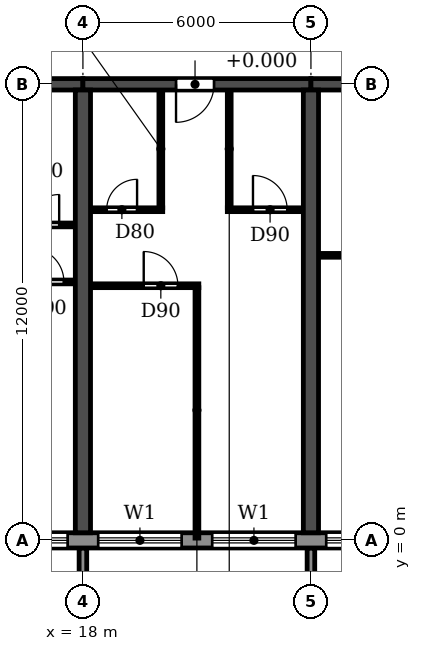
"""IFC4 building model, lengths in metres.
Left out: names, types, materials, properties, quantities, classifications, styles, units other than length and angle.
Written with IfcOpenShell. Run it as: python <this file> out.ifc"""

import sys

from ifc_helpers import new_model, si_unit, direction, frame, frame_2d, origin, place, context, subcontext, project, spatial, polyline, rectangle, outline, extrude, source, transform, mapped, element, fill, save


model = new_model("IFC4")
c1 = context("Model", 3, precision=1e-05, world=origin(), true_north=direction((0.0, 1.0)))
c2 = subcontext(c1, "Body", "Model", "MODEL_VIEW")
j1 = project(units=[si_unit("LENGTHUNIT", "METRE"), si_unit("PLANEANGLEUNIT", "RADIAN")], contexts=[c1])
p1 = place(None, origin())
s1 = spatial("IfcSite", under=j1, at=p1, CompositionType="ELEMENT")
p2 = place(p1, origin())
s2 = spatial("IfcBuilding", under=s1, at=p2, CompositionType="ELEMENT")
p3 = place(p2, frame((0.0, 0.0, 33.3)))
s3 = spatial("IfcBuildingStorey", under=s2, at=p3, CompositionType="ELEMENT", Elevation=33.3)
for number, where, z_axis, x_axis in (
    (1, (18.0, 0.2, 0.0), (0.0, 0.0, 1.0), (0.0, 1.0, 0.0)),
    (2, (24.0, 0.2, 0.0), (0.0, 0.0, 1.0), (0.0, 1.0, 0.0)),
):
    element("IfcWall", number, at=place(p3, frame(where, z_axis=z_axis, x_axis=x_axis)), inside=s3, PredefinedType="SHEAR", context=c2, shape_type="SweptSolid", body=[
        extrude(rectangle(XDim=11.65, YDim=0.4, at=frame_2d((5.825, 0.0))), origin(), (0.0, 0.0, 1.0), 3.05),
    ])
p4 = place(p3, frame((12.0, 12.0, 0.0), z_axis=(0.0, 0.0, 1.0), x_axis=(1.0, 0.0, 0.0)))
e3 = element("IfcWall", 3, at=p4, inside=s3, PredefinedType="SHEAR", context=c2, shape_type="SweptSolid", body=[
    extrude(rectangle(XDim=6.0, YDim=0.3, at=frame_2d((3.0, 0.0))), origin(), (0.0, 0.0, 1.0), 2.45),
])
p5 = place(p4, frame((2.55, 0.0, 0.0)))
e4 = element("IfcOpeningElement", 4, at=p5, cuts=e3, PredefinedType="OPENING", context=c2, shape_type="SweptSolid", body=[
    extrude(rectangle(XDim=1.0, YDim=2.1, at=frame_2d((0.5, 1.05))), frame((0.0, 0.16, 0.0), z_axis=(0.0, -1.0, 0.0), x_axis=(1.0, 0.0, 0.0)), (0.0, 0.0, 1.0), 0.32),
])
p6 = place(p3, frame((18.0, 12.0, 0.0), z_axis=(0.0, 0.0, 1.0), x_axis=(1.0, 0.0, 0.0)))
e5 = element("IfcWall", 5, at=p6, inside=s3, PredefinedType="SHEAR", context=c2, shape_type="SweptSolid", body=[
    extrude(rectangle(XDim=6.0, YDim=0.3, at=frame_2d((3.0, 0.0))), origin(), (0.0, 0.0, 1.0), 2.45),
])
p7 = place(p6, frame((2.45, 0.0, 0.0)))
e6 = element("IfcOpeningElement", 6, at=p7, cuts=e5, PredefinedType="OPENING", context=c2, shape_type="SweptSolid", body=[
    extrude(rectangle(XDim=1.0, YDim=2.1, at=frame_2d((0.5, 1.05))), frame((0.0, 0.16, 0.0), z_axis=(0.0, -1.0, 0.0), x_axis=(1.0, 0.0, 0.0)), (0.0, 0.0, 1.0), 0.32),
])
p8 = place(p3, frame((24.0, 12.0, 0.0), z_axis=(0.0, 0.0, 1.0), x_axis=(1.0, 0.0, 0.0)))
e7 = element("IfcWall", 7, at=p8, inside=s3, PredefinedType="SHEAR", context=c2, shape_type="SweptSolid", body=[
    extrude(rectangle(XDim=6.0, YDim=0.3, at=frame_2d((3.0, 0.0))), origin(), (0.0, 0.0, 1.0), 2.45),
])
p9 = place(p8, frame((2.55, 0.0, 0.0)))
e8 = element("IfcOpeningElement", 8, at=p9, cuts=e7, PredefinedType="OPENING", context=c2, shape_type="SweptSolid", body=[
    extrude(rectangle(XDim=1.0, YDim=2.1, at=frame_2d((0.5, 1.05))), frame((0.0, 0.16, 0.0), z_axis=(0.0, -1.0, 0.0), x_axis=(1.0, 0.0, 0.0)), (0.0, 0.0, 1.0), 0.32),
])
p10 = place(p3, frame((4.683, 0.0, 0.0), z_axis=(0.0, 0.0, 1.0), x_axis=(1.0, 0.0, 0.0)))
e9 = element("IfcWall", 9, at=p10, inside=s3, PredefinedType="STANDARD", context=c2, shape_type="SweptSolid", body=[
    extrude(rectangle(XDim=92.634, YDim=0.4, at=frame_2d((46.317, 0.0))), origin(), (0.0, 0.0, 1.0), 3.05),
])
p11 = place(p10, frame((1.717, 0.0, 0.9)))
e10 = element("IfcOpeningElement", 10, at=p11, cuts=e9, PredefinedType="OPENING", context=c2, shape_type="SweptSolid", body=[
    extrude(rectangle(XDim=2.2, YDim=1.5, at=frame_2d((1.1, 0.75))), frame((0.0, 0.21, 0.0), z_axis=(0.0, -1.0, 0.0), x_axis=(1.0, 0.0, 0.0)), (0.0, 0.0, 1.0), 0.42),
])
p12 = place(p10, frame((4.717, 0.0, 0.9)))
e11 = element("IfcOpeningElement", 11, at=p12, cuts=e9, PredefinedType="OPENING", context=c2, shape_type="SweptSolid", body=[
    extrude(rectangle(XDim=2.2, YDim=1.5, at=frame_2d((1.1, 0.75))), frame((0.0, 0.21, 0.0), z_axis=(0.0, -1.0, 0.0), x_axis=(1.0, 0.0, 0.0)), (0.0, 0.0, 1.0), 0.42),
])
p13 = place(p10, frame((7.917, 0.0, 0.0)))
e12 = element("IfcOpeningElement", 12, at=p13, cuts=e9, PredefinedType="OPENING", context=c2, shape_type="SweptSolid", body=[
    extrude(rectangle(XDim=1.8, YDim=2.4, at=frame_2d((0.9, 1.2))), frame((0.0, 0.21, 0.0), z_axis=(0.0, -1.0, 0.0), x_axis=(1.0, 0.0, 0.0)), (0.0, 0.0, 1.0), 0.42),
])
p14 = place(p10, frame((10.717, 0.0, 0.9)))
e13 = element("IfcOpeningElement", 13, at=p14, cuts=e9, PredefinedType="OPENING", context=c2, shape_type="SweptSolid", body=[
    extrude(rectangle(XDim=2.2, YDim=1.5, at=frame_2d((1.1, 0.75))), frame((0.0, 0.21, 0.0), z_axis=(0.0, -1.0, 0.0), x_axis=(1.0, 0.0, 0.0)), (0.0, 0.0, 1.0), 0.42),
])
p15 = place(p10, frame((13.717, 0.0, 0.9)))
e14 = element("IfcOpeningElement", 14, at=p15, cuts=e9, PredefinedType="OPENING", context=c2, shape_type="SweptSolid", body=[
    extrude(rectangle(XDim=2.2, YDim=1.5, at=frame_2d((1.1, 0.75))), frame((0.0, 0.21, 0.0), z_axis=(0.0, -1.0, 0.0), x_axis=(1.0, 0.0, 0.0)), (0.0, 0.0, 1.0), 0.42),
])
p16 = place(p10, frame((16.717, 0.0, 0.9)))
e15 = element("IfcOpeningElement", 15, at=p16, cuts=e9, PredefinedType="OPENING", context=c2, shape_type="SweptSolid", body=[
    extrude(rectangle(XDim=2.2, YDim=1.5, at=frame_2d((1.1, 0.75))), frame((0.0, 0.21, 0.0), z_axis=(0.0, -1.0, 0.0), x_axis=(1.0, 0.0, 0.0)), (0.0, 0.0, 1.0), 0.42),
])
p17 = place(p10, frame((19.717, 0.0, 0.9)))
e16 = element("IfcOpeningElement", 16, at=p17, cuts=e9, PredefinedType="OPENING", context=c2, shape_type="SweptSolid", body=[
    extrude(rectangle(XDim=2.2, YDim=1.5, at=frame_2d((1.1, 0.75))), frame((0.0, 0.21, 0.0), z_axis=(0.0, -1.0, 0.0), x_axis=(1.0, 0.0, 0.0)), (0.0, 0.0, 1.0), 0.42),
])
p18 = place(p10, frame((22.917, 0.0, 0.0)))
e17 = element("IfcOpeningElement", 17, at=p18, cuts=e9, PredefinedType="OPENING", context=c2, shape_type="SweptSolid", body=[
    extrude(rectangle(XDim=1.8, YDim=2.4, at=frame_2d((0.9, 1.2))), frame((0.0, 0.21, 0.0), z_axis=(0.0, -1.0, 0.0), x_axis=(1.0, 0.0, 0.0)), (0.0, 0.0, 1.0), 0.42),
])
p19 = place(p10, frame((25.717, 0.0, 0.9)))
e18 = element("IfcOpeningElement", 18, at=p19, cuts=e9, PredefinedType="OPENING", context=c2, shape_type="SweptSolid", body=[
    extrude(rectangle(XDim=2.2, YDim=1.5, at=frame_2d((1.1, 0.75))), frame((0.0, 0.21, 0.0), z_axis=(0.0, -1.0, 0.0), x_axis=(1.0, 0.0, 0.0)), (0.0, 0.0, 1.0), 0.42),
])
p20 = place(p10, frame((28.717, 0.0, 0.9)))
e19 = element("IfcOpeningElement", 19, at=p20, cuts=e9, PredefinedType="OPENING", context=c2, shape_type="SweptSolid", body=[
    extrude(rectangle(XDim=2.2, YDim=1.5, at=frame_2d((1.1, 0.75))), frame((0.0, 0.21, 0.0), z_axis=(0.0, -1.0, 0.0), x_axis=(1.0, 0.0, 0.0)), (0.0, 0.0, 1.0), 0.42),
])
p21 = place(p10, frame((31.717, 0.0, 0.9)))
e20 = element("IfcOpeningElement", 20, at=p21, cuts=e9, PredefinedType="OPENING", context=c2, shape_type="SweptSolid", body=[
    extrude(rectangle(XDim=2.2, YDim=1.5, at=frame_2d((1.1, 0.75))), frame((0.0, 0.21, 0.0), z_axis=(0.0, -1.0, 0.0), x_axis=(1.0, 0.0, 0.0)), (0.0, 0.0, 1.0), 0.42),
])
p22 = place(p10, frame((34.717, 0.0, 0.9)))
e21 = element("IfcOpeningElement", 21, at=p22, cuts=e9, PredefinedType="OPENING", context=c2, shape_type="SweptSolid", body=[
    extrude(rectangle(XDim=2.2, YDim=1.5, at=frame_2d((1.1, 0.75))), frame((0.0, 0.21, 0.0), z_axis=(0.0, -1.0, 0.0), x_axis=(1.0, 0.0, 0.0)), (0.0, 0.0, 1.0), 0.42),
])
p23 = place(p10, frame((37.717, 0.0, 0.9)))
e22 = element("IfcOpeningElement", 22, at=p23, cuts=e9, PredefinedType="OPENING", context=c2, shape_type="SweptSolid", body=[
    extrude(rectangle(XDim=2.2, YDim=1.5, at=frame_2d((1.1, 0.75))), frame((0.0, 0.21, 0.0), z_axis=(0.0, -1.0, 0.0), x_axis=(1.0, 0.0, 0.0)), (0.0, 0.0, 1.0), 0.42),
])
p24 = place(p10, frame((40.717, 0.0, 0.9)))
e23 = element("IfcOpeningElement", 23, at=p24, cuts=e9, PredefinedType="OPENING", context=c2, shape_type="SweptSolid", body=[
    extrude(rectangle(XDim=2.2, YDim=1.5, at=frame_2d((1.1, 0.75))), frame((0.0, 0.21, 0.0), z_axis=(0.0, -1.0, 0.0), x_axis=(1.0, 0.0, 0.0)), (0.0, 0.0, 1.0), 0.42),
])
p25 = place(p10, frame((43.717, 0.0, 0.9)))
e24 = element("IfcOpeningElement", 24, at=p25, cuts=e9, PredefinedType="OPENING", context=c2, shape_type="SweptSolid", body=[
    extrude(rectangle(XDim=2.2, YDim=1.5, at=frame_2d((1.1, 0.75))), frame((0.0, 0.21, 0.0), z_axis=(0.0, -1.0, 0.0), x_axis=(1.0, 0.0, 0.0)), (0.0, 0.0, 1.0), 0.42),
])
p26 = place(p10, frame((46.917, 0.0, 0.0)))
e25 = element("IfcOpeningElement", 25, at=p26, cuts=e9, PredefinedType="OPENING", context=c2, shape_type="SweptSolid", body=[
    extrude(rectangle(XDim=1.8, YDim=2.4, at=frame_2d((0.9, 1.2))), frame((0.0, 0.21, 0.0), z_axis=(0.0, -1.0, 0.0), x_axis=(1.0, 0.0, 0.0)), (0.0, 0.0, 1.0), 0.42),
])
p27 = place(p10, frame((49.717, 0.0, 0.9)))
e26 = element("IfcOpeningElement", 26, at=p27, cuts=e9, PredefinedType="OPENING", context=c2, shape_type="SweptSolid", body=[
    extrude(rectangle(XDim=2.2, YDim=1.5, at=frame_2d((1.1, 0.75))), frame((0.0, 0.21, 0.0), z_axis=(0.0, -1.0, 0.0), x_axis=(1.0, 0.0, 0.0)), (0.0, 0.0, 1.0), 0.42),
])
p28 = place(p10, frame((52.717, 0.0, 0.9)))
e27 = element("IfcOpeningElement", 27, at=p28, cuts=e9, PredefinedType="OPENING", context=c2, shape_type="SweptSolid", body=[
    extrude(rectangle(XDim=2.2, YDim=1.5, at=frame_2d((1.1, 0.75))), frame((0.0, 0.21, 0.0), z_axis=(0.0, -1.0, 0.0), x_axis=(1.0, 0.0, 0.0)), (0.0, 0.0, 1.0), 0.42),
])
p29 = place(p10, frame((55.717, 0.0, 0.9)))
e28 = element("IfcOpeningElement", 28, at=p29, cuts=e9, PredefinedType="OPENING", context=c2, shape_type="SweptSolid", body=[
    extrude(rectangle(XDim=2.2, YDim=1.5, at=frame_2d((1.1, 0.75))), frame((0.0, 0.21, 0.0), z_axis=(0.0, -1.0, 0.0), x_axis=(1.0, 0.0, 0.0)), (0.0, 0.0, 1.0), 0.42),
])
p30 = place(p10, frame((58.917, 0.0, 0.0)))
e29 = element("IfcOpeningElement", 29, at=p30, cuts=e9, PredefinedType="OPENING", context=c2, shape_type="SweptSolid", body=[
    extrude(rectangle(XDim=1.8, YDim=2.4, at=frame_2d((0.9, 1.2))), frame((0.0, 0.21, 0.0), z_axis=(0.0, -1.0, 0.0), x_axis=(1.0, 0.0, 0.0)), (0.0, 0.0, 1.0), 0.42),
])
p31 = place(p10, frame((61.717, 0.0, 0.9)))
e30 = element("IfcOpeningElement", 30, at=p31, cuts=e9, PredefinedType="OPENING", context=c2, shape_type="SweptSolid", body=[
    extrude(rectangle(XDim=2.2, YDim=1.5, at=frame_2d((1.1, 0.75))), frame((0.0, 0.21, 0.0), z_axis=(0.0, -1.0, 0.0), x_axis=(1.0, 0.0, 0.0)), (0.0, 0.0, 1.0), 0.42),
])
p32 = place(p10, frame((64.717, 0.0, 0.9)))
e31 = element("IfcOpeningElement", 31, at=p32, cuts=e9, PredefinedType="OPENING", context=c2, shape_type="SweptSolid", body=[
    extrude(rectangle(XDim=2.2, YDim=1.5, at=frame_2d((1.1, 0.75))), frame((0.0, 0.21, 0.0), z_axis=(0.0, -1.0, 0.0), x_axis=(1.0, 0.0, 0.0)), (0.0, 0.0, 1.0), 0.42),
])
p33 = place(p10, frame((67.717, 0.0, 0.9)))
e32 = element("IfcOpeningElement", 32, at=p33, cuts=e9, PredefinedType="OPENING", context=c2, shape_type="SweptSolid", body=[
    extrude(rectangle(XDim=2.2, YDim=1.5, at=frame_2d((1.1, 0.75))), frame((0.0, 0.21, 0.0), z_axis=(0.0, -1.0, 0.0), x_axis=(1.0, 0.0, 0.0)), (0.0, 0.0, 1.0), 0.42),
])
p34 = place(p10, frame((70.917, 0.0, 0.0)))
e33 = element("IfcOpeningElement", 33, at=p34, cuts=e9, PredefinedType="OPENING", context=c2, shape_type="SweptSolid", body=[
    extrude(rectangle(XDim=1.8, YDim=2.4, at=frame_2d((0.9, 1.2))), frame((0.0, 0.21, 0.0), z_axis=(0.0, -1.0, 0.0), x_axis=(1.0, 0.0, 0.0)), (0.0, 0.0, 1.0), 0.42),
])
p35 = place(p10, frame((73.717, 0.0, 0.9)))
e34 = element("IfcOpeningElement", 34, at=p35, cuts=e9, PredefinedType="OPENING", context=c2, shape_type="SweptSolid", body=[
    extrude(rectangle(XDim=2.2, YDim=1.5, at=frame_2d((1.1, 0.75))), frame((0.0, 0.21, 0.0), z_axis=(0.0, -1.0, 0.0), x_axis=(1.0, 0.0, 0.0)), (0.0, 0.0, 1.0), 0.42),
])
p36 = place(p10, frame((76.717, 0.0, 0.9)))
e35 = element("IfcOpeningElement", 35, at=p36, cuts=e9, PredefinedType="OPENING", context=c2, shape_type="SweptSolid", body=[
    extrude(rectangle(XDim=2.2, YDim=1.5, at=frame_2d((1.1, 0.75))), frame((0.0, 0.21, 0.0), z_axis=(0.0, -1.0, 0.0), x_axis=(1.0, 0.0, 0.0)), (0.0, 0.0, 1.0), 0.42),
])
p37 = place(p10, frame((79.717, 0.0, 0.9)))
e36 = element("IfcOpeningElement", 36, at=p37, cuts=e9, PredefinedType="OPENING", context=c2, shape_type="SweptSolid", body=[
    extrude(rectangle(XDim=2.2, YDim=1.5, at=frame_2d((1.1, 0.75))), frame((0.0, 0.21, 0.0), z_axis=(0.0, -1.0, 0.0), x_axis=(1.0, 0.0, 0.0)), (0.0, 0.0, 1.0), 0.42),
])
p38 = place(p10, frame((82.717, 0.0, 0.9)))
e37 = element("IfcOpeningElement", 37, at=p38, cuts=e9, PredefinedType="OPENING", context=c2, shape_type="SweptSolid", body=[
    extrude(rectangle(XDim=2.2, YDim=1.5, at=frame_2d((1.1, 0.75))), frame((0.0, 0.21, 0.0), z_axis=(0.0, -1.0, 0.0), x_axis=(1.0, 0.0, 0.0)), (0.0, 0.0, 1.0), 0.42),
])
p39 = place(p10, frame((85.717, 0.0, 0.9)))
e38 = element("IfcOpeningElement", 38, at=p39, cuts=e9, PredefinedType="OPENING", context=c2, shape_type="SweptSolid", body=[
    extrude(rectangle(XDim=2.2, YDim=1.5, at=frame_2d((1.1, 0.75))), frame((0.0, 0.21, 0.0), z_axis=(0.0, -1.0, 0.0), x_axis=(1.0, 0.0, 0.0)), (0.0, 0.0, 1.0), 0.42),
])
p40 = place(p10, frame((88.717, 0.0, 0.9)))
e39 = element("IfcOpeningElement", 39, at=p40, cuts=e9, PredefinedType="OPENING", context=c2, shape_type="SweptSolid", body=[
    extrude(rectangle(XDim=2.2, YDim=1.5, at=frame_2d((1.1, 0.75))), frame((0.0, 0.21, 0.0), z_axis=(0.0, -1.0, 0.0), x_axis=(1.0, 0.0, 0.0)), (0.0, 0.0, 1.0), 0.42),
])
m1 = source(origin(), c2, "Body", "SweptSolid", [
    extrude(outline(polyline([(0.0, 0.0), (0.2, 0.0), (0.2, 1.65), (0.0, 1.65), (0.0, 0.0)])), origin(), (0.0, 0.0, 1.0), 3.1),
])
for number, where in (
    (40, (17.9, -1.85, 0.0)),
    (41, (23.9, -1.85, 0.0)),
):
    element("IfcWall", number, at=place(p3, frame(where)), inside=s3, PredefinedType="STANDARD", context=c2, shape_type="MappedRepresentation", body=[
        mapped(m1, transform((0.0, 0.0, 0.0))),
    ])
p41 = place(p3, frame((18.21, 6.7, 0.0), z_axis=(0.0, 0.0, 1.0), x_axis=(1.0, 0.0, 0.0)))
e42 = element("IfcWall", 42, at=p41, inside=s3, PredefinedType="PARTITIONING", context=c2, shape_type="SweptSolid", body=[
    extrude(rectangle(XDim=2.84, YDim=0.1, at=frame_2d((1.42, 0.0))), origin(), (0.0, 0.0, 1.0), 3.05),
])
p42 = place(p41, frame((1.39, 0.0, 0.0)))
e43 = element("IfcOpeningElement", 43, at=p42, cuts=e42, PredefinedType="OPENING", context=c2, shape_type="SweptSolid", body=[
    extrude(rectangle(XDim=0.9, YDim=2.1, at=frame_2d((0.45, 1.05))), frame((0.0, 0.06, 0.0), z_axis=(0.0, -1.0, 0.0), x_axis=(1.0, 0.0, 0.0)), (0.0, 0.0, 1.0), 0.12),
])
p43 = place(p3, frame((14.95, 6.8, 0.0), z_axis=(0.0, 0.0, 1.0), x_axis=(1.0, 0.0, 0.0)))
e44 = element("IfcWall", 44, at=p43, inside=s3, PredefinedType="PARTITIONING", context=c2, shape_type="SweptSolid", body=[
    extrude(rectangle(XDim=2.84, YDim=0.1, at=frame_2d((1.42, 0.0))), origin(), (0.0, 0.0, 1.0), 3.05),
])
p44 = place(p43, frame((1.65, 0.0, 0.0)))
e45 = element("IfcOpeningElement", 45, at=p44, cuts=e44, PredefinedType="OPENING", context=c2, shape_type="SweptSolid", body=[
    extrude(rectangle(XDim=0.9, YDim=2.1, at=frame_2d((0.45, 1.05))), frame((0.0, 0.06, 0.0), z_axis=(0.0, -1.0, 0.0), x_axis=(1.0, 0.0, 0.0)), (0.0, 0.0, 1.0), 0.12),
])
p45 = place(p3, frame((24.21, 7.5, 0.0), z_axis=(0.0, 0.0, 1.0), x_axis=(1.0, 0.0, 0.0)))
e46 = element("IfcWall", 46, at=p45, inside=s3, PredefinedType="PARTITIONING", context=c2, shape_type="SweptSolid", body=[
    extrude(rectangle(XDim=1.99, YDim=0.1, at=frame_2d((0.995, 0.0))), origin(), (0.0, 0.0, 1.0), 3.05),
])
p46 = place(p3, frame((15.9, 8.3, 0.0), z_axis=(0.0, 0.0, 1.0), x_axis=(1.0, 0.0, 0.0)))
e47 = element("IfcWall", 47, at=p46, inside=s3, PredefinedType="PARTITIONING", context=c2, shape_type="SweptSolid", body=[
    extrude(rectangle(XDim=1.89, YDim=0.1, at=frame_2d((0.945, 0.0))), origin(), (0.0, 0.0, 1.0), 3.05),
])
p47 = place(p46, frame((0.675, 0.0, 0.0)))
e48 = element("IfcOpeningElement", 48, at=p47, cuts=e47, PredefinedType="OPENING", context=c2, shape_type="SweptSolid", body=[
    extrude(rectangle(XDim=0.8, YDim=2.1, at=frame_2d((0.4, 1.05))), frame((0.0, 0.06, 0.0), z_axis=(0.0, -1.0, 0.0), x_axis=(1.0, 0.0, 0.0)), (0.0, 0.0, 1.0), 0.12),
])
p48 = place(p3, frame((18.21, 8.7, 0.0), z_axis=(0.0, 0.0, 1.0), x_axis=(1.0, 0.0, 0.0)))
e49 = element("IfcWall", 49, at=p48, inside=s3, PredefinedType="PARTITIONING", context=c2, shape_type="SweptSolid", body=[
    extrude(rectangle(XDim=1.89, YDim=0.1, at=frame_2d((0.945, 0.0))), origin(), (0.0, 0.0, 1.0), 3.05),
])
p49 = place(p48, frame((0.415, 0.0, 0.0)))
e50 = element("IfcOpeningElement", 50, at=p49, cuts=e49, PredefinedType="OPENING", context=c2, shape_type="SweptSolid", body=[
    extrude(rectangle(XDim=0.8, YDim=2.1, at=frame_2d((0.4, 1.05))), frame((0.0, 0.06, 0.0), z_axis=(0.0, -1.0, 0.0), x_axis=(1.0, 0.0, 0.0)), (0.0, 0.0, 1.0), 0.12),
])
p50 = place(p3, frame((21.8, 8.7, 0.0), z_axis=(0.0, 0.0, 1.0), x_axis=(1.0, 0.0, 0.0)))
e51 = element("IfcWall", 51, at=p50, inside=s3, PredefinedType="PARTITIONING", context=c2, shape_type="SweptSolid", body=[
    extrude(rectangle(XDim=1.99, YDim=0.1, at=frame_2d((0.995, 0.0))), origin(), (0.0, 0.0, 1.0), 3.05),
])
p51 = place(p50, frame((0.675, 0.0, 0.0)))
e52 = element("IfcOpeningElement", 52, at=p51, cuts=e51, PredefinedType="OPENING", context=c2, shape_type="SweptSolid", body=[
    extrude(rectangle(XDim=0.9, YDim=2.1, at=frame_2d((0.45, 1.05))), frame((0.0, 0.06, 0.0), z_axis=(0.0, -1.0, 0.0), x_axis=(1.0, 0.0, 0.0)), (0.0, 0.0, 1.0), 0.12),
])
p52 = place(p3, frame((20.05, 8.75, 0.0), z_axis=(0.0, 0.0, 1.0), x_axis=(0.0, 1.0, 0.0)))
e53 = element("IfcWall", 53, at=p52, inside=s3, PredefinedType="PARTITIONING", context=c2, shape_type="SweptSolid", body=[
    extrude(rectangle(XDim=3.09, YDim=0.1, at=frame_2d((1.545, 0.0))), origin(), (0.0, 0.0, 1.0), 3.05),
])
p53 = place(p3, frame((21.0, 0.06, 0.0), z_axis=(0.0, 0.0, 1.0), x_axis=(0.0, 1.0, 0.0)))
e54 = element("IfcWall", 54, at=p53, inside=s3, PredefinedType="PARTITIONING", context=c2, shape_type="SweptSolid", body=[
    extrude(rectangle(XDim=6.59, YDim=0.1, at=frame_2d((3.295, 0.0))), origin(), (0.0, 0.0, 1.0), 3.05),
])
p54 = place(p3, frame((21.85, 8.75, 0.0), z_axis=(0.0, 0.0, 1.0), x_axis=(0.0, 1.0, 0.0)))
e55 = element("IfcWall", 55, at=p54, inside=s3, PredefinedType="PARTITIONING", context=c2, shape_type="SweptSolid", body=[
    extrude(rectangle(XDim=3.09, YDim=0.1, at=frame_2d((1.545, 0.0))), origin(), (0.0, 0.0, 1.0), 3.05),
])
p55 = place(p14, origin())
e56 = element("IfcWindow", 56, at=p55, inside=s3, PartitioningType="DOUBLE_PANEL_HORIZONTAL", PredefinedType="WINDOW", context=c2, shape_type="SweptSolid", body=[
    extrude(rectangle(XDim=2.2, YDim=1.5, at=frame_2d((1.1, 0.75))), frame((0.0, 0.03, 0.0), z_axis=(0.0, -1.0, 0.0), x_axis=(1.0, 0.0, 0.0)), (0.0, 0.0, 1.0), 0.06),
])
fill(e13, e56)
p56 = place(p15, origin())
e57 = element("IfcWindow", 57, at=p56, inside=s3, PartitioningType="DOUBLE_PANEL_HORIZONTAL", PredefinedType="WINDOW", context=c2, shape_type="SweptSolid", body=[
    extrude(rectangle(XDim=2.2, YDim=1.5, at=frame_2d((1.1, 0.75))), frame((0.0, 0.03, 0.0), z_axis=(0.0, -1.0, 0.0), x_axis=(1.0, 0.0, 0.0)), (0.0, 0.0, 1.0), 0.06),
])
fill(e14, e57)
p57 = place(p16, origin())
e58 = element("IfcWindow", 58, at=p57, inside=s3, PartitioningType="DOUBLE_PANEL_HORIZONTAL", PredefinedType="WINDOW", context=c2, shape_type="SweptSolid", body=[
    extrude(rectangle(XDim=2.2, YDim=1.5, at=frame_2d((1.1, 0.75))), frame((0.0, 0.03, 0.0), z_axis=(0.0, -1.0, 0.0), x_axis=(1.0, 0.0, 0.0)), (0.0, 0.0, 1.0), 0.06),
])
fill(e15, e58)
p58 = place(p17, origin())
e59 = element("IfcWindow", 59, at=p58, inside=s3, PartitioningType="DOUBLE_PANEL_HORIZONTAL", PredefinedType="WINDOW", context=c2, shape_type="SweptSolid", body=[
    extrude(rectangle(XDim=2.2, YDim=1.5, at=frame_2d((1.1, 0.75))), frame((0.0, 0.03, 0.0), z_axis=(0.0, -1.0, 0.0), x_axis=(1.0, 0.0, 0.0)), (0.0, 0.0, 1.0), 0.06),
])
fill(e16, e59)
p59 = place(p47, origin())
e60 = element("IfcDoor", 60, at=p59, inside=s3, OperationType="SINGLE_SWING_RIGHT", PredefinedType="DOOR", context=c2, shape_type="SweptSolid", body=[
    extrude(rectangle(XDim=0.8, YDim=2.1, at=frame_2d((0.4, 1.05))), frame((0.0, 0.025, 0.0), z_axis=(0.0, -1.0, 0.0), x_axis=(1.0, 0.0, 0.0)), (0.0, 0.0, 1.0), 0.05),
])
fill(e48, e60)
p60 = place(p44, origin())
e61 = element("IfcDoor", 61, at=p60, inside=s3, OperationType="SINGLE_SWING_LEFT", PredefinedType="DOOR", context=c2, shape_type="SweptSolid", body=[
    extrude(rectangle(XDim=0.9, YDim=2.1, at=frame_2d((0.45, 1.05))), frame((0.0, 0.025, 0.0), z_axis=(0.0, -1.0, 0.0), x_axis=(1.0, 0.0, 0.0)), (0.0, 0.0, 1.0), 0.05),
])
fill(e45, e61)
p61 = place(p49, origin())
e62 = element("IfcDoor", 62, at=p61, inside=s3, OperationType="SINGLE_SWING_RIGHT", PredefinedType="DOOR", context=c2, shape_type="SweptSolid", body=[
    extrude(rectangle(XDim=0.8, YDim=2.1, at=frame_2d((0.4, 1.05))), frame((0.0, 0.025, 0.0), z_axis=(0.0, -1.0, 0.0), x_axis=(1.0, 0.0, 0.0)), (0.0, 0.0, 1.0), 0.05),
])
fill(e50, e62)
p62 = place(p42, origin())
e63 = element("IfcDoor", 63, at=p62, inside=s3, OperationType="SINGLE_SWING_LEFT", PredefinedType="DOOR", context=c2, shape_type="SweptSolid", body=[
    extrude(rectangle(XDim=0.9, YDim=2.1, at=frame_2d((0.45, 1.05))), frame((0.0, 0.025, 0.0), z_axis=(0.0, -1.0, 0.0), x_axis=(1.0, 0.0, 0.0)), (0.0, 0.0, 1.0), 0.05),
])
fill(e43, e63)
p63 = place(p7, frame((1.0, 0.0, 0.0), z_axis=(0.0, 0.0, 1.0), x_axis=(-1.0, 0.0, 0.0)))
e64 = element("IfcDoor", 64, at=p63, inside=s3, OperationType="SINGLE_SWING_RIGHT", PredefinedType="DOOR", context=c2, shape_type="SweptSolid", body=[
    extrude(rectangle(XDim=1.0, YDim=2.1, at=frame_2d((0.5, 1.05))), frame((0.0, 0.025, 0.0), z_axis=(0.0, -1.0, 0.0), x_axis=(1.0, 0.0, 0.0)), (0.0, 0.0, 1.0), 0.05),
])
fill(e6, e64)
p64 = place(p51, origin())
e65 = element("IfcDoor", 65, at=p64, inside=s3, OperationType="SINGLE_SWING_LEFT", PredefinedType="DOOR", context=c2, shape_type="SweptSolid", body=[
    extrude(rectangle(XDim=0.9, YDim=2.1, at=frame_2d((0.45, 1.05))), frame((0.0, 0.025, 0.0), z_axis=(0.0, -1.0, 0.0), x_axis=(1.0, 0.0, 0.0)), (0.0, 0.0, 1.0), 0.05),
])
fill(e52, e65)
save(model, sys.argv[1])
